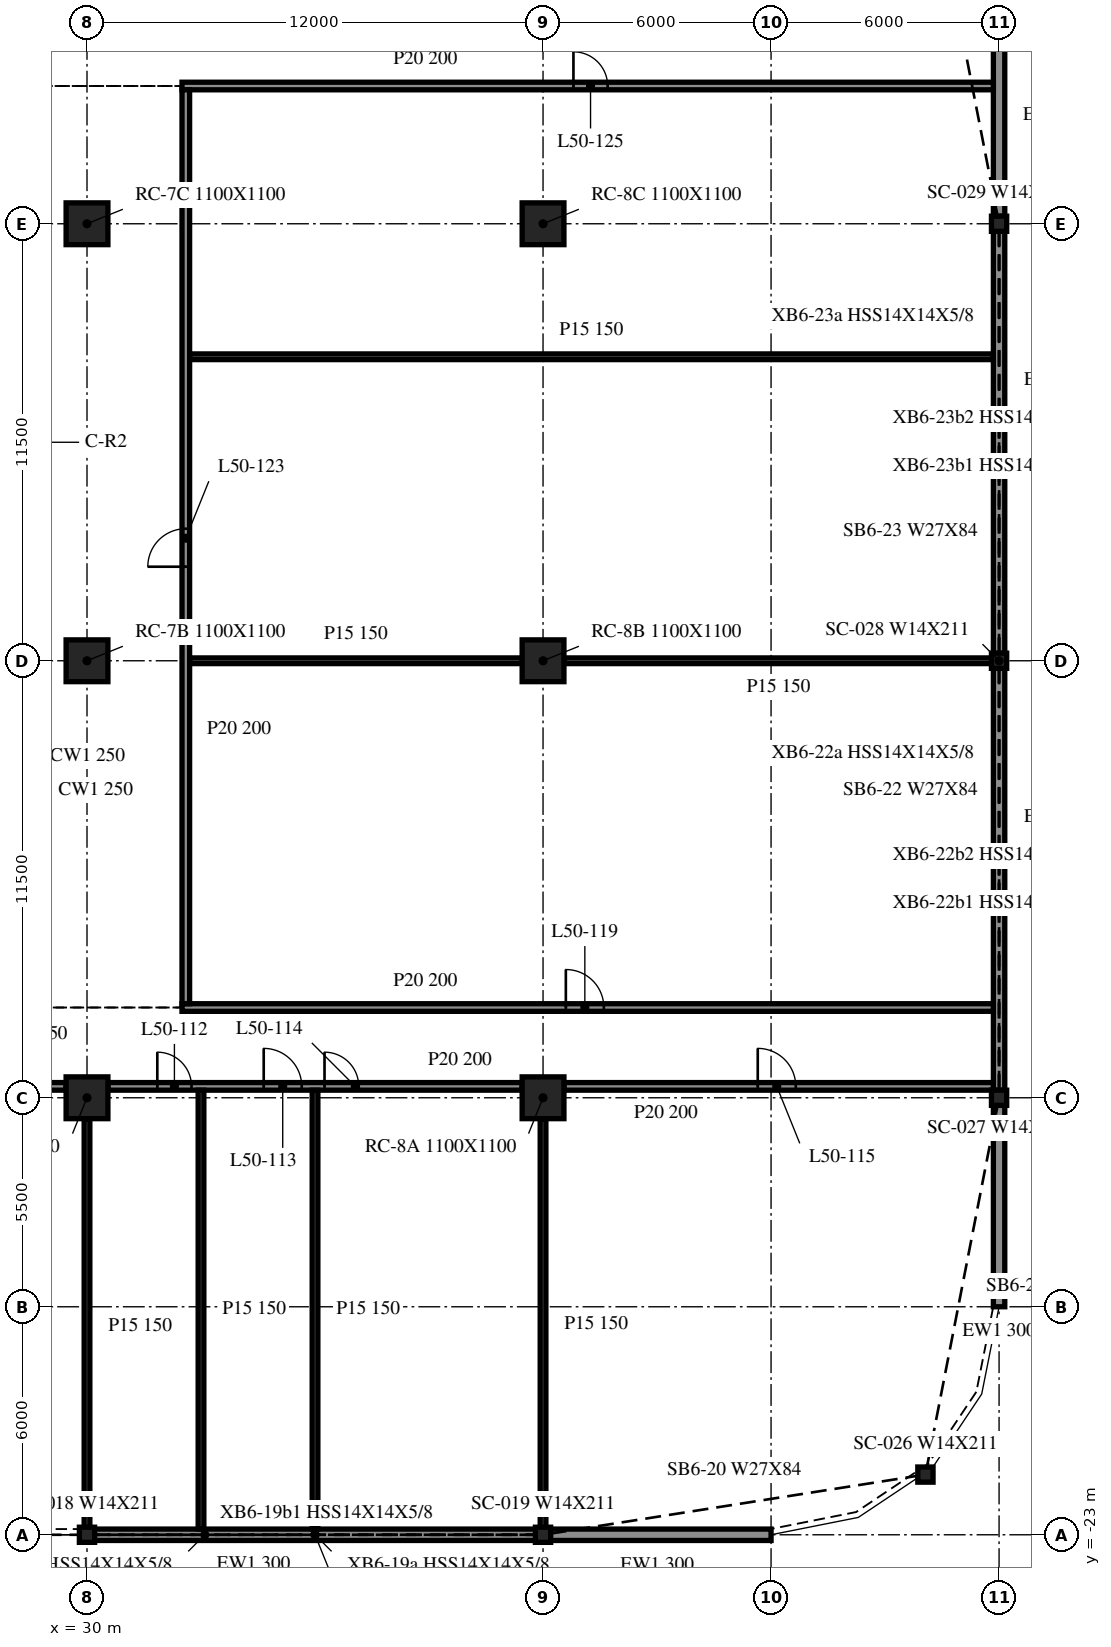
"""IFC4 building model, lengths in metres.
Left out: names, types, materials, properties, quantities, classifications, styles, units other than length and angle.
Written with IfcOpenShell. Run it as: python <this file> out.ifc"""

import sys

from ifc_helpers import new_model, si_unit, direction, frame, frame_2d, origin, origin_2d, place, context, subcontext, project, spatial, rectangle, i_section, extrude, element, fill, save


model = new_model("IFC4")
c1 = context("Model", 3, precision=1e-05, world=origin(), true_north=direction((0.0, 1.0)))
c2 = subcontext(c1, "Body", "Model", "MODEL_VIEW")
j1 = project(units=[si_unit("LENGTHUNIT", "METRE"), si_unit("PLANEANGLEUNIT", "RADIAN")], contexts=[c1])
p1 = place(None, origin())
s1 = spatial("IfcSite", under=j1, at=p1, CompositionType="ELEMENT")
p2 = place(p1, origin())
s2 = spatial("IfcBuilding", under=s1, at=p2, CompositionType="ELEMENT")
p3 = place(p2, frame((0.0, 0.0, 209.1)))
s3 = spatial("IfcBuildingStorey", under=s2, at=p3, CompositionType="ELEMENT", Elevation=209.1)
for number, where, z_axis, x_axis in (
    (1, (30.0, -11.5, -0.34), (0.0, 0.0, 1.0), (1.0, 0.0, 0.0)),
    (2, (30.0, 0.0, -0.34), (0.0, 0.0, 1.0), (1.0, 0.0, 0.0)),
    (3, (30.0, 11.5, -0.34), (0.0, 0.0, 1.0), (1.0, 0.0, 0.0)),
    (4, (42.0, -11.5, -0.34), (0.0, 0.0, 1.0), (1.0, 0.0, 0.0)),
    (5, (42.0, 0.0, -0.34), (0.0, 0.0, 1.0), (1.0, 0.0, 0.0)),
    (6, (42.0, 11.5, -0.34), (0.0, 0.0, 1.0), (1.0, 0.0, 0.0)),
):
    element("IfcColumn", number, at=place(p3, frame(where, z_axis=z_axis, x_axis=x_axis)), inside=s3, PredefinedType="COLUMN", context=c2, shape_type="SweptSolid", body=[
        extrude(rectangle(XDim=1.1, YDim=1.1, at=origin_2d()), origin(), (0.0, 0.0, 1.0), 3.8),
    ])
for number, where, z_axis, x_axis in (
    (7, (30.0, -23.0, -0.34), (0.0, 0.0, 1.0), (1.0, 0.0, 0.0)),
    (8, (42.0, -23.0, -0.34), (0.0, 0.0, 1.0), (1.0, 0.0, 0.0)),
    (9, (52.062, -21.416, -0.34), (0.0, 0.0, 1.0), (1.0, 0.0, 0.0)),
    (10, (54.0, -11.5, -0.34), (0.0, 0.0, 1.0), (1.0, 0.0, 0.0)),
    (11, (54.0, 0.0, -0.34), (0.0, 0.0, 1.0), (1.0, 0.0, 0.0)),
    (12, (54.0, 11.5, -0.34), (0.0, 0.0, 1.0), (1.0, 0.0, 0.0)),
):
    element("IfcColumn", number, at=place(p3, frame(where, z_axis=z_axis, x_axis=x_axis)), inside=s3, PredefinedType="COLUMN", context=c2, shape_type="SweptSolid", body=[
        extrude(i_section(OverallWidth=0.401, OverallDepth=0.399, WebThickness=0.025, FlangeThickness=0.04, at=origin_2d()), origin(), (0.0, 0.0, 1.0), 3.8),
    ])
p4 = place(p3, frame((30.012, -23.0, 0.0), z_axis=(0.0, 0.0, 1.0), x_axis=(1.0, 0.0, 0.0)))
e13 = element("IfcWall", 13, at=p4, inside=s3, PredefinedType="NOTDEFINED", context=c2, shape_type="SweptSolid", body=[
    extrude(rectangle(XDim=11.975, YDim=0.3, at=frame_2d((5.988, 0.0))), origin(), (0.0, 0.0, 1.0), 2.782),
])
p5 = place(p3, frame((42.012, -23.0, 0.0), z_axis=(0.0, 0.0, 1.0), x_axis=(1.0, 0.0, 0.0)))
e14 = element("IfcWall", 14, at=p5, inside=s3, PredefinedType="NOTDEFINED", context=c2, shape_type="SweptSolid", body=[
    extrude(rectangle(XDim=5.988, YDim=0.3, at=frame_2d((2.994, 0.0))), origin(), (0.0, 0.0, 1.0), 2.782),
])
p6 = place(p3, frame((54.0, -17.0, 0.0), z_axis=(0.0, 0.0, 1.0), x_axis=(0.0, 1.0, 0.0)))
e15 = element("IfcWall", 15, at=p6, inside=s3, PredefinedType="NOTDEFINED", context=c2, shape_type="SweptSolid", body=[
    extrude(rectangle(XDim=5.3, YDim=0.3, at=frame_2d((2.65, 0.0))), origin(), (0.0, 0.0, 1.0), 2.782),
])
for number, where, z_axis, x_axis in (
    (16, (54.0, -11.3, 0.0), (0.0, 0.0, 1.0), (0.0, 1.0, 0.0)),
    (17, (54.0, 0.2, 0.0), (0.0, 0.0, 1.0), (0.0, 1.0, 0.0)),
):
    element("IfcWall", number, at=place(p3, frame(where, z_axis=z_axis, x_axis=x_axis)), inside=s3, PredefinedType="NOTDEFINED", context=c2, shape_type="SweptSolid", body=[
        extrude(rectangle(XDim=11.1, YDim=0.3, at=frame_2d((5.55, 0.0))), origin(), (0.0, 0.0, 1.0), 2.782),
    ])
p7 = place(p3, frame((54.0, 11.7, 0.0), z_axis=(0.0, 0.0, 1.0), x_axis=(0.0, 1.0, 0.0)))
e18 = element("IfcWall", 18, at=p7, inside=s3, PredefinedType="NOTDEFINED", context=c2, shape_type="SweptSolid", body=[
    extrude(rectangle(XDim=5.3, YDim=0.3, at=frame_2d((2.65, 0.0))), origin(), (0.0, 0.0, 1.0), 2.782),
])
p8 = place(p3, frame((18.55, -11.2, 0.0), z_axis=(0.0, 0.0, 1.0), x_axis=(1.0, 0.0, 0.0)))
e19 = element("IfcWall", 19, at=p8, inside=s3, PredefinedType="PARTITIONING", context=c2, shape_type="SweptSolid", body=[
    extrude(rectangle(XDim=10.9, YDim=0.2, at=frame_2d((5.45, 0.0))), origin(), (0.0, 0.0, 1.0), 3.46),
])
p9 = place(p8, frame((4.9, 0.0, 0.0)))
e20 = element("IfcOpeningElement", 20, at=p9, cuts=e19, PredefinedType="OPENING", context=c2, shape_type="SweptSolid", body=[
    extrude(rectangle(XDim=1.0, YDim=2.1, at=frame_2d((0.5, 1.05))), frame((0.0, 0.11, 0.0), z_axis=(0.0, -1.0, 0.0), x_axis=(1.0, 0.0, 0.0)), (0.0, 0.0, 1.0), 0.22),
])
p10 = place(p3, frame((30.55, -11.2, 0.0), z_axis=(0.0, 0.0, 1.0), x_axis=(1.0, 0.0, 0.0)))
e21 = element("IfcWall", 21, at=p10, inside=s3, PredefinedType="PARTITIONING", context=c2, shape_type="SweptSolid", body=[
    extrude(rectangle(XDim=10.9, YDim=0.2, at=frame_2d((5.45, 0.0))), origin(), (0.0, 0.0, 1.0), 3.46),
])
p11 = place(p10, frame((1.3, 0.0, 0.0)))
e22 = element("IfcOpeningElement", 22, at=p11, cuts=e21, PredefinedType="OPENING", context=c2, shape_type="SweptSolid", body=[
    extrude(rectangle(XDim=0.9, YDim=2.1, at=frame_2d((0.45, 1.05))), frame((0.0, 0.11, 0.0), z_axis=(0.0, -1.0, 0.0), x_axis=(1.0, 0.0, 0.0)), (0.0, 0.0, 1.0), 0.22),
])
p12 = place(p10, frame((4.1, 0.0, 0.0)))
e23 = element("IfcOpeningElement", 23, at=p12, cuts=e21, PredefinedType="OPENING", context=c2, shape_type="SweptSolid", body=[
    extrude(rectangle(XDim=1.0, YDim=2.1, at=frame_2d((0.5, 1.05))), frame((0.0, 0.11, 0.0), z_axis=(0.0, -1.0, 0.0), x_axis=(1.0, 0.0, 0.0)), (0.0, 0.0, 1.0), 0.22),
])
p13 = place(p10, frame((5.7, 0.0, 0.0)))
e24 = element("IfcOpeningElement", 24, at=p13, cuts=e21, PredefinedType="OPENING", context=c2, shape_type="SweptSolid", body=[
    extrude(rectangle(XDim=0.9, YDim=2.1, at=frame_2d((0.45, 1.05))), frame((0.0, 0.11, 0.0), z_axis=(0.0, -1.0, 0.0), x_axis=(1.0, 0.0, 0.0)), (0.0, 0.0, 1.0), 0.22),
])
p14 = place(p3, frame((42.55, -11.2, 0.0), z_axis=(0.0, 0.0, 1.0), x_axis=(1.0, 0.0, 0.0)))
e25 = element("IfcWall", 25, at=p14, inside=s3, PredefinedType="PARTITIONING", context=c2, shape_type="SweptSolid", body=[
    extrude(rectangle(XDim=11.3, YDim=0.2, at=frame_2d((5.65, 0.0))), origin(), (0.0, 0.0, 1.0), 3.46),
])
p15 = place(p14, frame((5.1, 0.0, 0.0)))
e26 = element("IfcOpeningElement", 26, at=p15, cuts=e25, PredefinedType="OPENING", context=c2, shape_type="SweptSolid", body=[
    extrude(rectangle(XDim=1.0, YDim=2.1, at=frame_2d((0.5, 1.05))), frame((0.0, 0.11, 0.0), z_axis=(0.0, -1.0, 0.0), x_axis=(1.0, 0.0, 0.0)), (0.0, 0.0, 1.0), 0.22),
])
p16 = place(p3, frame((32.5, -9.125, 0.0), z_axis=(0.0, 0.0, 1.0), x_axis=(1.0, 0.0, 0.0)))
e27 = element("IfcWall", 27, at=p16, inside=s3, PredefinedType="PARTITIONING", context=c2, shape_type="SweptSolid", body=[
    extrude(rectangle(XDim=21.35, YDim=0.2, at=frame_2d((10.675, 0.0))), origin(), (0.0, 0.0, 1.0), 3.46),
])
p17 = place(p16, frame((10.1, 0.0, 0.0)))
e28 = element("IfcOpeningElement", 28, at=p17, cuts=e27, PredefinedType="OPENING", context=c2, shape_type="SweptSolid", body=[
    extrude(rectangle(XDim=1.0, YDim=2.1, at=frame_2d((0.5, 1.05))), frame((0.0, 0.11, 0.0), z_axis=(0.0, -1.0, 0.0), x_axis=(1.0, 0.0, 0.0)), (0.0, 0.0, 1.0), 0.22),
])
p18 = place(p3, frame((32.7, 0.0, 0.0), z_axis=(0.0, 0.0, 1.0), x_axis=(1.0, 0.0, 0.0)))
e29 = element("IfcWall", 29, at=p18, inside=s3, PredefinedType="PARTITIONING", context=c2, shape_type="SweptSolid", body=[
    extrude(rectangle(XDim=8.75, YDim=0.15, at=frame_2d((4.375, 0.0))), origin(), (0.0, 0.0, 1.0), 3.46),
])
p19 = place(p3, frame((42.55, 0.0, 0.0), z_axis=(0.0, 0.0, 1.0), x_axis=(1.0, 0.0, 0.0)))
e30 = element("IfcWall", 30, at=p19, inside=s3, PredefinedType="PARTITIONING", context=c2, shape_type="SweptSolid", body=[
    extrude(rectangle(XDim=11.3, YDim=0.15, at=frame_2d((5.65, 0.0))), origin(), (0.0, 0.0, 1.0), 3.46),
])
p20 = place(p3, frame((32.7, 8.0, 0.0), z_axis=(0.0, 0.0, 1.0), x_axis=(1.0, 0.0, 0.0)))
e31 = element("IfcWall", 31, at=p20, inside=s3, PredefinedType="PARTITIONING", context=c2, shape_type="SweptSolid", body=[
    extrude(rectangle(XDim=21.15, YDim=0.15, at=frame_2d((10.575, 0.0))), origin(), (0.0, 0.0, 1.0), 3.46),
])
p21 = place(p3, frame((32.5, 15.125, 0.0), z_axis=(0.0, 0.0, 1.0), x_axis=(1.0, 0.0, 0.0)))
e32 = element("IfcWall", 32, at=p21, inside=s3, PredefinedType="PARTITIONING", context=c2, shape_type="SweptSolid", body=[
    extrude(rectangle(XDim=21.35, YDim=0.2, at=frame_2d((10.675, 0.0))), origin(), (0.0, 0.0, 1.0), 3.46),
])
p22 = place(p21, frame((10.3, 0.0, 0.0)))
e33 = element("IfcOpeningElement", 33, at=p22, cuts=e32, PredefinedType="OPENING", context=c2, shape_type="SweptSolid", body=[
    extrude(rectangle(XDim=0.9, YDim=2.1, at=frame_2d((0.45, 1.05))), frame((0.0, 0.11, 0.0), z_axis=(0.0, -1.0, 0.0), x_axis=(1.0, 0.0, 0.0)), (0.0, 0.0, 1.0), 0.22),
])
p23 = place(p3, frame((30.0, -22.975, 0.0), z_axis=(0.0, 0.0, 1.0), x_axis=(0.0, 1.0, 0.0)))
e34 = element("IfcWall", 34, at=p23, inside=s3, PredefinedType="PARTITIONING", context=c2, shape_type="SweptSolid", body=[
    extrude(rectangle(XDim=10.925, YDim=0.15, at=frame_2d((5.462, 0.0))), origin(), (0.0, 0.0, 1.0), 3.46),
])
p24 = place(p3, frame((32.6, -9.025, 0.0), z_axis=(0.0, 0.0, 1.0), x_axis=(0.0, 1.0, 0.0)))
e35 = element("IfcWall", 35, at=p24, inside=s3, PredefinedType="PARTITIONING", context=c2, shape_type="SweptSolid", body=[
    extrude(rectangle(XDim=24.05, YDim=0.2, at=frame_2d((12.025, 0.0))), origin(), (0.0, 0.0, 1.0), 3.46),
])
p25 = place(p24, frame((11.5, 0.0, 0.0)))
e36 = element("IfcOpeningElement", 36, at=p25, cuts=e35, PredefinedType="OPENING", context=c2, shape_type="SweptSolid", body=[
    extrude(rectangle(XDim=1.0, YDim=2.1, at=frame_2d((0.5, 1.05))), frame((0.0, 0.11, 0.0), z_axis=(0.0, -1.0, 0.0), x_axis=(1.0, 0.0, 0.0)), (0.0, 0.0, 1.0), 0.22),
])
for number, where, z_axis, x_axis in (
    (37, (33.0, -22.85, 0.0), (0.0, 0.0, 1.0), (0.0, 1.0, 0.0)),
    (38, (36.0, -22.85, 0.0), (0.0, 0.0, 1.0), (0.0, 1.0, 0.0)),
):
    element("IfcWall", number, at=place(p3, frame(where, z_axis=z_axis, x_axis=x_axis)), inside=s3, PredefinedType="PARTITIONING", context=c2, shape_type="SweptSolid", body=[
        extrude(rectangle(XDim=11.55, YDim=0.15, at=frame_2d((5.775, 0.0))), origin(), (0.0, 0.0, 1.0), 3.46),
    ])
p26 = place(p3, frame((42.0, -22.85, 0.0), z_axis=(0.0, 0.0, 1.0), x_axis=(0.0, 1.0, 0.0)))
e39 = element("IfcWall", 39, at=p26, inside=s3, PredefinedType="PARTITIONING", context=c2, shape_type="SweptSolid", body=[
    extrude(rectangle(XDim=10.8, YDim=0.15, at=frame_2d((5.4, 0.0))), origin(), (0.0, 0.0, 1.0), 3.46),
])
p27 = place(p11, origin())
e40 = element("IfcDoor", 40, at=p27, inside=s3, OperationType="SINGLE_SWING_RIGHT", PredefinedType="DOOR", context=c2, shape_type="SweptSolid", body=[
    extrude(rectangle(XDim=0.9, YDim=2.1, at=frame_2d((0.45, 1.05))), frame((0.0, 0.025, 0.0), z_axis=(0.0, -1.0, 0.0), x_axis=(1.0, 0.0, 0.0)), (0.0, 0.0, 1.0), 0.05),
])
fill(e22, e40)
p28 = place(p12, origin())
e41 = element("IfcDoor", 41, at=p28, inside=s3, OperationType="SINGLE_SWING_RIGHT", PredefinedType="DOOR", context=c2, shape_type="SweptSolid", body=[
    extrude(rectangle(XDim=1.0, YDim=2.1, at=frame_2d((0.5, 1.05))), frame((0.0, 0.025, 0.0), z_axis=(0.0, -1.0, 0.0), x_axis=(1.0, 0.0, 0.0)), (0.0, 0.0, 1.0), 0.05),
])
fill(e23, e41)
p29 = place(p13, origin())
e42 = element("IfcDoor", 42, at=p29, inside=s3, OperationType="SINGLE_SWING_LEFT", PredefinedType="DOOR", context=c2, shape_type="SweptSolid", body=[
    extrude(rectangle(XDim=0.9, YDim=2.1, at=frame_2d((0.45, 1.05))), frame((0.0, 0.025, 0.0), z_axis=(0.0, -1.0, 0.0), x_axis=(1.0, 0.0, 0.0)), (0.0, 0.0, 1.0), 0.05),
])
fill(e24, e42)
p30 = place(p15, origin())
e43 = element("IfcDoor", 43, at=p30, inside=s3, OperationType="SINGLE_SWING_RIGHT", PredefinedType="DOOR", context=c2, shape_type="SweptSolid", body=[
    extrude(rectangle(XDim=1.0, YDim=2.1, at=frame_2d((0.5, 1.05))), frame((0.0, 0.025, 0.0), z_axis=(0.0, -1.0, 0.0), x_axis=(1.0, 0.0, 0.0)), (0.0, 0.0, 1.0), 0.05),
])
fill(e26, e43)
p31 = place(p17, origin())
e44 = element("IfcDoor", 44, at=p31, inside=s3, OperationType="SINGLE_SWING_LEFT", PredefinedType="DOOR", context=c2, shape_type="SweptSolid", body=[
    extrude(rectangle(XDim=1.0, YDim=2.1, at=frame_2d((0.5, 1.05))), frame((0.0, 0.025, 0.0), z_axis=(0.0, -1.0, 0.0), x_axis=(1.0, 0.0, 0.0)), (0.0, 0.0, 1.0), 0.05),
])
fill(e28, e44)
p32 = place(p25, origin())
e45 = element("IfcDoor", 45, at=p32, inside=s3, OperationType="SINGLE_SWING_RIGHT", PredefinedType="DOOR", context=c2, shape_type="SweptSolid", body=[
    extrude(rectangle(XDim=1.0, YDim=2.1, at=frame_2d((0.5, 1.05))), frame((0.0, 0.025, 0.0), z_axis=(0.0, -1.0, 0.0), x_axis=(1.0, 0.0, 0.0)), (0.0, 0.0, 1.0), 0.05),
])
fill(e36, e45)
p33 = place(p22, origin())
e46 = element("IfcDoor", 46, at=p33, inside=s3, OperationType="SINGLE_SWING_LEFT", PredefinedType="DOOR", context=c2, shape_type="SweptSolid", body=[
    extrude(rectangle(XDim=0.9, YDim=2.1, at=frame_2d((0.45, 1.05))), frame((0.0, 0.025, 0.0), z_axis=(0.0, -1.0, 0.0), x_axis=(1.0, 0.0, 0.0)), (0.0, 0.0, 1.0), 0.05),
])
fill(e33, e46)
save(model, sys.argv[1])
